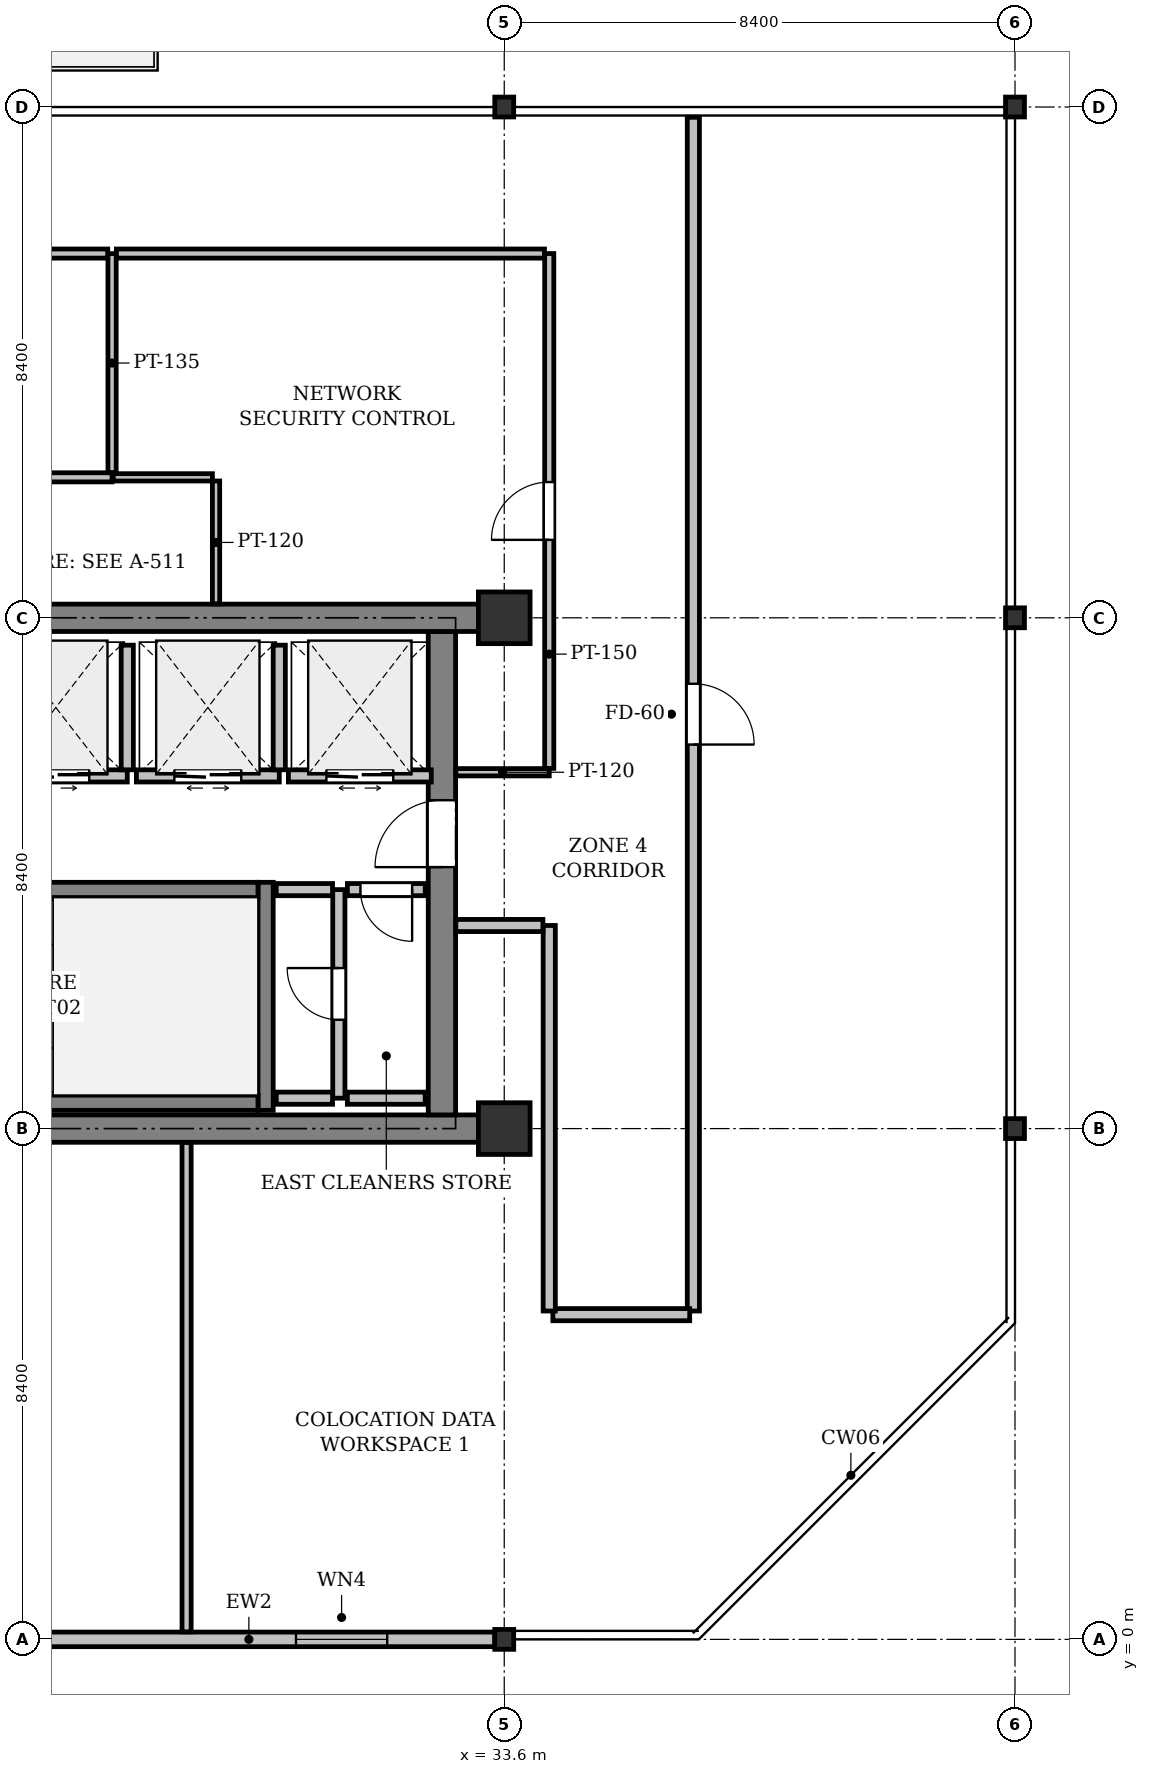
"""IFC4 building model, lengths in metres.
Left out: names, types, materials, properties, quantities, classifications, styles, units other than length and angle.
Written with IfcOpenShell. Run it as: python <this file> out.ifc"""

import sys

from ifc_helpers import new_model, si_unit, direction, frame, frame_2d, origin, origin_2d, place, context, subcontext, project, spatial, rectangle, i_section, extrude, element, fill, save


model = new_model("IFC4")
c1 = context("Model", 3, precision=1e-05, world=origin(), true_north=direction((0.0, 1.0)))
c2 = subcontext(c1, "Body", "Model", "MODEL_VIEW")
j1 = project(units=[si_unit("LENGTHUNIT", "METRE"), si_unit("PLANEANGLEUNIT", "RADIAN")], contexts=[c1])
p1 = place(None, origin())
s1 = spatial("IfcSite", under=j1, at=p1, CompositionType="ELEMENT")
p2 = place(p1, origin())
s2 = spatial("IfcBuilding", under=s1, at=p2, CompositionType="ELEMENT")
p3 = place(p2, frame((0.0, 0.0, 262.2)))
s3 = spatial("IfcBuildingStorey", under=s2, at=p3, CompositionType="ELEMENT", Elevation=262.2)
p4 = place(p3, frame((33.6, 0.0, 0.0), z_axis=(0.0, 0.0, 1.0), x_axis=(1.0, 0.0, 0.0)))
e1 = element("IfcColumn", 1, at=p4, inside=s3, PredefinedType="COLUMN", context=c2, shape_type="SweptSolid", body=[
    extrude(i_section(OverallWidth=0.311, OverallDepth=0.327, WebThickness=0.016, FlangeThickness=0.025, FilletRadius=0.017, at=origin_2d()), origin(), (0.0, 0.0, 1.0), 4.0),
])
for number, where, z_axis, x_axis in (
    (2, (33.6, 8.4, 0.0), (0.0, 0.0, 1.0), (1.0, 0.0, 0.0)),
    (3, (33.6, 16.8, 0.0), (0.0, 0.0, 1.0), (1.0, 0.0, 0.0)),
):
    element("IfcColumn", number, at=place(p3, frame(where, z_axis=z_axis, x_axis=x_axis)), inside=s3, PredefinedType="COLUMN", context=c2, shape_type="SweptSolid", body=[
        extrude(rectangle(XDim=0.85, YDim=0.85, at=origin_2d()), origin(), (0.0, 0.0, 1.0), 4.0),
    ])
for number, where, z_axis, x_axis in (
    (4, (33.6, 25.2, 0.0), (0.0, 0.0, 1.0), (1.0, 0.0, 0.0)),
    (5, (42.0, 8.4, 0.0), (0.0, 0.0, 1.0), (1.0, 0.0, 0.0)),
    (6, (42.0, 16.8, 0.0), (0.0, 0.0, 1.0), (1.0, 0.0, 0.0)),
    (7, (42.0, 25.2, 0.0), (0.0, 0.0, 1.0), (1.0, 0.0, 0.0)),
):
    element("IfcColumn", number, at=place(p3, frame(where, z_axis=z_axis, x_axis=x_axis)), inside=s3, PredefinedType="COLUMN", context=c2, shape_type="SweptSolid", body=[
        extrude(i_section(OverallWidth=0.311, OverallDepth=0.327, WebThickness=0.016, FlangeThickness=0.025, FilletRadius=0.017, at=origin_2d()), origin(), (0.0, 0.0, 1.0), 4.0),
    ])
p5 = place(p3, frame((33.445, 0.0, 0.0), z_axis=(0.0, 0.0, 1.0), x_axis=(-1.0, 0.0, 0.0)))
e8 = element("IfcWall", 8, at=p5, inside=s3, PredefinedType="STANDARD", context=c2, shape_type="SweptSolid", body=[
    extrude(rectangle(XDim=8.089, YDim=0.24, at=frame_2d((4.044, 0.0))), origin(), (0.0, 0.0, 1.0), 3.475),
])
p6 = place(p5, frame((1.77, 0.0, 0.9)))
e9 = element("IfcOpeningElement", 9, at=p6, cuts=e8, PredefinedType="OPENING", context=c2, shape_type="SweptSolid", body=[
    extrude(rectangle(XDim=1.5, YDim=1.6, at=frame_2d((0.75, 0.8))), frame((0.0, 0.13, 0.0), z_axis=(0.0, -1.0, 0.0), x_axis=(1.0, 0.0, 0.0)), (0.0, 0.0, 1.0), 0.26),
])
p7 = place(p3, frame((25.625, 8.4, 0.0), z_axis=(0.0, 0.0, 1.0), x_axis=(1.0, 0.0, 0.0)))
e10 = element("IfcWall", 10, at=p7, inside=s3, PredefinedType="SHEAR", context=c2, shape_type="SweptSolid", body=[
    extrude(rectangle(XDim=7.55, YDim=0.45, at=frame_2d((3.775, 0.0))), origin(), (0.0, 0.0, 1.0), 3.725),
])
p8 = place(p3, frame((32.575, 8.625, 0.0), z_axis=(0.0, 0.0, 1.0), x_axis=(0.0, 1.0, 0.0)))
e11 = element("IfcWall", 11, at=p8, inside=s3, PredefinedType="SHEAR", context=c2, shape_type="SweptSolid", body=[
    extrude(rectangle(XDim=7.95, YDim=0.45, at=frame_2d((3.975, 0.0))), origin(), (0.0, 0.0, 1.0), 3.725),
])
p9 = place(p8, frame((4.075, 0.0, 0.0)))
e12 = element("IfcOpeningElement", 12, at=p9, cuts=e11, PredefinedType="OPENING", context=c2, shape_type="SweptSolid", body=[
    extrude(rectangle(XDim=1.1, YDim=2.15, at=frame_2d((0.55, 1.075))), frame((0.0, 0.235, 0.0), z_axis=(0.0, -1.0, 0.0), x_axis=(1.0, 0.0, 0.0)), (0.0, 0.0, 1.0), 0.47),
])
p10 = place(p3, frame((25.625, 16.8, 0.0), z_axis=(0.0, 0.0, 1.0), x_axis=(1.0, 0.0, 0.0)))
e13 = element("IfcWall", 13, at=p10, inside=s3, PredefinedType="SHEAR", context=c2, shape_type="SweptSolid", body=[
    extrude(rectangle(XDim=7.55, YDim=0.45, at=frame_2d((3.775, 0.0))), origin(), (0.0, 0.0, 1.0), 3.725),
])
p11 = place(p3, frame((29.675, 8.7, 0.0), z_axis=(0.0, 0.0, 1.0), x_axis=(0.0, 1.0, 0.0)))
e14 = element("IfcWall", 14, at=p11, inside=s3, PredefinedType="SHEAR", context=c2, shape_type="SweptSolid", body=[
    extrude(rectangle(XDim=3.75, YDim=0.25, at=frame_2d((1.875, 0.0))), origin(), (0.0, 0.0, 1.0), 3.725),
])
p12 = place(p3, frame((21.8, 8.825, 0.0), z_axis=(0.0, 0.0, 1.0), x_axis=(1.0, 0.0, 0.0)))
e15 = element("IfcWall", 15, at=p12, inside=s3, PredefinedType="SHEAR", context=c2, shape_type="SweptSolid", body=[
    extrude(rectangle(XDim=7.75, YDim=0.25, at=frame_2d((3.875, 0.0))), origin(), (0.0, 0.0, 1.0), 3.725),
])
p13 = place(p3, frame((21.8, 12.325, 0.0), z_axis=(0.0, 0.0, 1.0), x_axis=(1.0, 0.0, 0.0)))
e16 = element("IfcWall", 16, at=p13, inside=s3, PredefinedType="SHEAR", context=c2, shape_type="SweptSolid", body=[
    extrude(rectangle(XDim=7.75, YDim=0.25, at=frame_2d((3.875, 0.0))), origin(), (0.0, 0.0, 1.0), 3.725),
])
p14 = place(p13, frame((0.22, 0.0, 0.0)))
e17 = element("IfcOpeningElement", 17, at=p14, cuts=e16, PredefinedType="OPENING", context=c2, shape_type="SweptSolid", body=[
    extrude(rectangle(XDim=1.1, YDim=2.15, at=frame_2d((0.55, 1.075))), frame((0.0, 0.135, 0.0), z_axis=(0.0, -1.0, 0.0), x_axis=(1.0, 0.0, 0.0)), (0.0, 0.0, 1.0), 0.27),
])
p15 = place(p3, frame((25.05, 14.2, 0.0), z_axis=(0.0, 0.0, 1.0), x_axis=(1.0, 0.0, 0.0)))
e18 = element("IfcWall", 18, at=p15, inside=s3, PredefinedType="PARTITIONING", context=c2, shape_type="SweptSolid", body=[
    extrude(rectangle(XDim=2.35, YDim=0.2, at=frame_2d((1.175, 0.0))), origin(), (0.0, 0.0, 1.0), 3.725),
])
p16 = place(p15, frame((0.625, 0.0, 0.0)))
e19 = element("IfcOpeningElement", 19, at=p16, cuts=e18, PredefinedType="OPENING", context=c2, shape_type="SweptSolid", body=[
    extrude(rectangle(XDim=1.1, YDim=2.2, at=frame_2d((0.55, 1.1))), frame((0.0, 0.11, 0.0), z_axis=(0.0, -1.0, 0.0), x_axis=(1.0, 0.0, 0.0)), (0.0, 0.0, 1.0), 0.22),
])
p17 = place(p3, frame((27.4, 14.3, 0.0), z_axis=(0.0, 0.0, 1.0), x_axis=(0.0, 1.0, 0.0)))
e20 = element("IfcWall", 20, at=p17, inside=s3, PredefinedType="PARTITIONING", context=c2, shape_type="SweptSolid", body=[
    extrude(rectangle(XDim=2.05, YDim=0.2, at=frame_2d((1.025, 0.0))), origin(), (0.0, 0.0, 1.0), 3.725),
])
p18 = place(p3, frame((27.55, 14.2, 0.0), z_axis=(0.0, 0.0, 1.0), x_axis=(1.0, 0.0, 0.0)))
e21 = element("IfcWall", 21, at=p18, inside=s3, PredefinedType="PARTITIONING", context=c2, shape_type="SweptSolid", body=[
    extrude(rectangle(XDim=2.35, YDim=0.2, at=frame_2d((1.175, 0.0))), origin(), (0.0, 0.0, 1.0), 3.725),
])
p19 = place(p18, frame((0.625, 0.0, 0.0)))
e22 = element("IfcOpeningElement", 22, at=p19, cuts=e21, PredefinedType="OPENING", context=c2, shape_type="SweptSolid", body=[
    extrude(rectangle(XDim=1.1, YDim=2.2, at=frame_2d((0.55, 1.1))), frame((0.0, 0.11, 0.0), z_axis=(0.0, -1.0, 0.0), x_axis=(1.0, 0.0, 0.0)), (0.0, 0.0, 1.0), 0.22),
])
p20 = place(p3, frame((29.9, 14.3, 0.0), z_axis=(0.0, 0.0, 1.0), x_axis=(0.0, 1.0, 0.0)))
e23 = element("IfcWall", 23, at=p20, inside=s3, PredefinedType="PARTITIONING", context=c2, shape_type="SweptSolid", body=[
    extrude(rectangle(XDim=2.05, YDim=0.2, at=frame_2d((1.025, 0.0))), origin(), (0.0, 0.0, 1.0), 3.725),
])
p21 = place(p3, frame((30.05, 14.2, 0.0), z_axis=(0.0, 0.0, 1.0), x_axis=(1.0, 0.0, 0.0)))
e24 = element("IfcWall", 24, at=p21, inside=s3, PredefinedType="PARTITIONING", context=c2, shape_type="SweptSolid", body=[
    extrude(rectangle(XDim=2.35, YDim=0.2, at=frame_2d((1.175, 0.0))), origin(), (0.0, 0.0, 1.0), 3.725),
])
p22 = place(p21, frame((0.625, 0.0, 0.0)))
e25 = element("IfcOpeningElement", 25, at=p22, cuts=e24, PredefinedType="OPENING", context=c2, shape_type="SweptSolid", body=[
    extrude(rectangle(XDim=1.1, YDim=2.2, at=frame_2d((0.55, 1.1))), frame((0.0, 0.11, 0.0), z_axis=(0.0, -1.0, 0.0), x_axis=(1.0, 0.0, 0.0)), (0.0, 0.0, 1.0), 0.22),
])
p23 = place(p3, frame((30.88, 8.9, 0.0), z_axis=(0.0, 0.0, 1.0), x_axis=(0.0, 1.0, 0.0)))
e26 = element("IfcWall", 26, at=p23, inside=s3, PredefinedType="PARTITIONING", context=c2, shape_type="SweptSolid", body=[
    extrude(rectangle(XDim=3.43, YDim=0.2, at=frame_2d((1.715, 0.0))), origin(), (0.0, 0.0, 1.0), 3.725),
])
p24 = place(p23, frame((1.29, 0.0, 0.0)))
e27 = element("IfcOpeningElement", 27, at=p24, cuts=e26, PredefinedType="OPENING", context=c2, shape_type="SweptSolid", body=[
    extrude(rectangle(XDim=0.85, YDim=2.15, at=frame_2d((0.425, 1.075))), frame((0.0, 0.11, 0.0), z_axis=(0.0, -1.0, 0.0), x_axis=(1.0, 0.0, 0.0)), (0.0, 0.0, 1.0), 0.22),
])
for number, where, z_axis, x_axis in (
    (28, (30.776, 12.33, 0.0), (0.0, 0.0, 1.0), (-1.0, 0.0, 0.0)),
    (29, (29.85, 8.9, 0.0), (0.0, 0.0, 1.0), (1.0, 0.0, 0.0)),
):
    element("IfcWall", number, at=place(p3, frame(where, z_axis=z_axis, x_axis=x_axis)), inside=s3, PredefinedType="PARTITIONING", context=c2, shape_type="SweptSolid", body=[
        extrude(rectangle(XDim=0.926, YDim=0.2, at=frame_2d((0.463, 0.0))), origin(), (0.0, 0.0, 1.0), 3.725),
    ])
p25 = place(p3, frame((32.3, 12.33, 0.0), z_axis=(0.0, 0.0, 1.0), x_axis=(-1.0, 0.0, 0.0)))
e30 = element("IfcWall", 30, at=p25, inside=s3, PredefinedType="PARTITIONING", context=c2, shape_type="SweptSolid", body=[
    extrude(rectangle(XDim=1.28, YDim=0.2, at=frame_2d((0.64, 0.0))), origin(), (0.0, 0.0, 1.0), 3.725),
])
p26 = place(p25, frame((0.215, 0.0, 0.0)))
e31 = element("IfcOpeningElement", 31, at=p26, cuts=e30, PredefinedType="OPENING", context=c2, shape_type="SweptSolid", body=[
    extrude(rectangle(XDim=0.85, YDim=2.15, at=frame_2d((0.425, 1.075))), frame((0.0, 0.11, 0.0), z_axis=(0.0, -1.0, 0.0), x_axis=(1.0, 0.0, 0.0)), (0.0, 0.0, 1.0), 0.22),
])
p27 = place(p3, frame((31.02, 8.9, 0.0), z_axis=(0.0, 0.0, 1.0), x_axis=(1.0, 0.0, 0.0)))
e32 = element("IfcWall", 32, at=p27, inside=s3, PredefinedType="PARTITIONING", context=c2, shape_type="SweptSolid", body=[
    extrude(rectangle(XDim=1.28, YDim=0.2, at=frame_2d((0.64, 0.0))), origin(), (0.0, 0.0, 1.0), 3.725),
])
p28 = place(p3, frame((20.031, 19.11, 0.0), z_axis=(0.0, 0.0, 1.0), x_axis=(1.0, 0.0, 0.0)))
e33 = element("IfcWall", 33, at=p28, inside=s3, PredefinedType="PARTITIONING", context=c2, shape_type="SweptSolid", body=[
    extrude(rectangle(XDim=7.118, YDim=0.15, at=frame_2d((3.559, 0.0))), origin(), (0.0, 0.0, 1.0), 3.319),
])
p29 = place(p28, frame((3.084, 0.0, 0.0)))
e34 = element("IfcOpeningElement", 34, at=p29, cuts=e33, PredefinedType="OPENING", context=c2, shape_type="SweptSolid", body=[
    extrude(rectangle(XDim=0.95, YDim=2.15, at=frame_2d((0.475, 1.075))), frame((0.0, 0.085, 0.0), z_axis=(0.0, -1.0, 0.0), x_axis=(1.0, 0.0, 0.0)), (0.0, 0.0, 1.0), 0.17),
])
p30 = place(p3, frame((27.15, 19.189, 0.0), z_axis=(0.0, 0.0, 1.0), x_axis=(0.0, 1.0, 0.0)))
e35 = element("IfcWall", 35, at=p30, inside=s3, PredefinedType="PARTITIONING", context=c2, shape_type="SweptSolid", body=[
    extrude(rectangle(XDim=3.601, YDim=0.135, at=frame_2d((1.801, 0.0))), origin(), (0.0, 0.0, 1.0), 3.725),
])
p31 = place(p3, frame((27.079, 22.79, 0.0), z_axis=(0.0, 0.0, 1.0), x_axis=(-1.0, 0.0, 0.0)))
e36 = element("IfcWall", 36, at=p31, inside=s3, PredefinedType="PARTITIONING", context=c2, shape_type="SweptSolid", body=[
    extrude(rectangle(XDim=7.047, YDim=0.15, at=frame_2d((3.523, 0.0))), origin(), (0.0, 0.0, 1.0), 3.319),
])
p32 = place(p3, frame((28.86, 19.05, 0.0), z_axis=(0.0, 0.0, 1.0), x_axis=(0.0, -1.0, 0.0)))
e37 = element("IfcWall", 37, at=p32, inside=s3, PredefinedType="PARTITIONING", context=c2, shape_type="SweptSolid", body=[
    extrude(rectangle(XDim=2.021, YDim=0.12, at=frame_2d((1.01, 0.0))), origin(), (0.0, 0.0, 1.0), 3.725),
])
p33 = place(p3, frame((32.804, 14.26, 0.0), z_axis=(0.0, 0.0, 1.0), x_axis=(1.0, 0.0, 0.0)))
e38 = element("IfcWall", 38, at=p33, inside=s3, PredefinedType="PARTITIONING", context=c2, shape_type="SweptSolid", body=[
    extrude(rectangle(XDim=1.536, YDim=0.12, at=frame_2d((0.768, 0.0))), origin(), (0.0, 0.0, 1.0), 3.319),
])
p34 = place(p3, frame((34.34, 14.324, 0.0), z_axis=(0.0, 0.0, 1.0), x_axis=(0.0, 1.0, 0.0)))
e39 = element("IfcWall", 39, at=p34, inside=s3, PredefinedType="PARTITIONING", context=c2, shape_type="SweptSolid", body=[
    extrude(rectangle(XDim=8.466, YDim=0.15, at=frame_2d((4.233, 0.0))), origin(), (0.0, 0.0, 1.0), 3.271),
])
p35 = place(p34, frame((3.758, 0.0, 0.0)))
e40 = element("IfcOpeningElement", 40, at=p35, cuts=e39, PredefinedType="OPENING", context=c2, shape_type="SweptSolid", body=[
    extrude(rectangle(XDim=0.95, YDim=2.15, at=frame_2d((0.475, 1.075))), frame((0.0, 0.085, 0.0), z_axis=(0.0, -1.0, 0.0), x_axis=(1.0, 0.0, 0.0)), (0.0, 0.0, 1.0), 0.17),
])
p36 = place(p3, frame((34.261, 22.79, 0.0), z_axis=(0.0, 0.0, 1.0), x_axis=(-1.0, 0.0, 0.0)))
e41 = element("IfcWall", 41, at=p36, inside=s3, PredefinedType="PARTITIONING", context=c2, shape_type="SweptSolid", body=[
    extrude(rectangle(XDim=7.04, YDim=0.15, at=frame_2d((3.52, 0.0))), origin(), (0.0, 0.0, 1.0), 3.319),
])
p37 = place(p3, frame((27.17, 19.11, 0.0), z_axis=(0.0, 0.0, 1.0), x_axis=(1.0, 0.0, 0.0)))
e42 = element("IfcWall", 42, at=p37, inside=s3, PredefinedType="PARTITIONING", context=c2, shape_type="SweptSolid", body=[
    extrude(rectangle(XDim=1.63, YDim=0.12, at=frame_2d((0.815, 0.0))), origin(), (0.0, 0.0, 1.0), 3.725),
])
p38 = place(p3, frame((28.375, 0.124, 0.0), z_axis=(0.0, 0.0, 1.0), x_axis=(0.0, 1.0, 0.0)))
e43 = element("IfcWall", 43, at=p38, inside=s3, PredefinedType="PARTITIONING", context=c2, shape_type="SweptSolid", body=[
    extrude(rectangle(XDim=8.047, YDim=0.15, at=frame_2d((4.023, 0.0))), origin(), (0.0, 0.0, 1.0), 3.725),
])
p39 = place(p3, frame((36.71, 25.031, 0.0), z_axis=(0.0, 0.0, 1.0), x_axis=(0.0, -1.0, 0.0)))
e44 = element("IfcWall", 44, at=p39, inside=s3, PredefinedType="PARTITIONING", context=c2, shape_type="SweptSolid", body=[
    extrude(rectangle(XDim=19.631, YDim=0.2, at=frame_2d((9.815, 0.0))), origin(), (0.0, 0.0, 1.0), 3.271),
])
p40 = place(p39, frame((9.315, 0.0, 0.0)))
e45 = element("IfcOpeningElement", 45, at=p40, cuts=e44, PredefinedType="OPENING", context=c2, shape_type="SweptSolid", body=[
    extrude(rectangle(XDim=1.0, YDim=2.15, at=frame_2d((0.5, 1.075))), frame((0.0, 0.11, 0.0), z_axis=(0.0, -1.0, 0.0), x_axis=(1.0, 0.0, 0.0)), (0.0, 0.0, 1.0), 0.22),
])
p41 = place(p3, frame((36.65, 5.34, 0.0), z_axis=(0.0, 0.0, 1.0), x_axis=(-1.0, 0.0, 0.0)))
e46 = element("IfcWall", 46, at=p41, inside=s3, PredefinedType="PARTITIONING", context=c2, shape_type="SweptSolid", body=[
    extrude(rectangle(XDim=2.25, YDim=0.2, at=frame_2d((1.125, 0.0))), origin(), (0.0, 0.0, 1.0), 3.725),
])
p42 = place(p3, frame((34.34, 5.4, 0.0), z_axis=(0.0, 0.0, 1.0), x_axis=(0.0, 1.0, 0.0)))
e47 = element("IfcWall", 47, at=p42, inside=s3, PredefinedType="PARTITIONING", context=c2, shape_type="SweptSolid", body=[
    extrude(rectangle(XDim=6.34, YDim=0.2, at=frame_2d((3.17, 0.0))), origin(), (0.0, 0.0, 1.0), 3.271),
])
p43 = place(p3, frame((34.236, 11.74, 0.0), z_axis=(0.0, 0.0, 1.0), x_axis=(-1.0, 0.0, 0.0)))
e48 = element("IfcWall", 48, at=p43, inside=s3, PredefinedType="PARTITIONING", context=c2, shape_type="SweptSolid", body=[
    extrude(rectangle(XDim=1.432, YDim=0.2, at=frame_2d((0.716, 0.0))), origin(), (0.0, 0.0, 1.0), 3.319),
])
p44 = place(p6, origin())
e49 = element("IfcWindow", 49, at=p44, inside=s3, PartitioningType="SINGLE_PANEL", PredefinedType="WINDOW", context=c2, shape_type="SweptSolid", body=[
    extrude(rectangle(XDim=1.5, YDim=1.6, at=frame_2d((0.75, 0.8))), frame((0.0, 0.03, 0.0), z_axis=(0.0, -1.0, 0.0), x_axis=(1.0, 0.0, 0.0)), (0.0, 0.0, 1.0), 0.06),
])
fill(e9, e49)
p45 = place(p9, origin())
e50 = element("IfcDoor", 50, at=p45, inside=s3, OperationType="SINGLE_SWING_LEFT", PredefinedType="DOOR", context=c2, shape_type="SweptSolid", body=[
    extrude(rectangle(XDim=1.1, YDim=2.15, at=frame_2d((0.55, 1.075))), frame((0.0, 0.025, 0.0), z_axis=(0.0, -1.0, 0.0), x_axis=(1.0, 0.0, 0.0)), (0.0, 0.0, 1.0), 0.05),
])
fill(e12, e50)
p46 = place(p16, origin())
e51 = element("IfcDoor", 51, at=p46, inside=s3, OperationType="DOUBLE_DOOR_SLIDING", PredefinedType="DOOR", context=c2, shape_type="SweptSolid", body=[
    extrude(rectangle(XDim=1.1, YDim=2.2, at=frame_2d((0.55, 1.1))), frame((0.0, 0.025, 0.0), z_axis=(0.0, -1.0, 0.0), x_axis=(1.0, 0.0, 0.0)), (0.0, 0.0, 1.0), 0.05),
])
fill(e19, e51)
p47 = place(p19, origin())
e52 = element("IfcDoor", 52, at=p47, inside=s3, OperationType="DOUBLE_DOOR_SLIDING", PredefinedType="DOOR", context=c2, shape_type="SweptSolid", body=[
    extrude(rectangle(XDim=1.1, YDim=2.2, at=frame_2d((0.55, 1.1))), frame((0.0, 0.025, 0.0), z_axis=(0.0, -1.0, 0.0), x_axis=(1.0, 0.0, 0.0)), (0.0, 0.0, 1.0), 0.05),
])
fill(e22, e52)
p48 = place(p22, origin())
e53 = element("IfcDoor", 53, at=p48, inside=s3, OperationType="DOUBLE_DOOR_SLIDING", PredefinedType="DOOR", context=c2, shape_type="SweptSolid", body=[
    extrude(rectangle(XDim=1.1, YDim=2.2, at=frame_2d((0.55, 1.1))), frame((0.0, 0.025, 0.0), z_axis=(0.0, -1.0, 0.0), x_axis=(1.0, 0.0, 0.0)), (0.0, 0.0, 1.0), 0.05),
])
fill(e25, e53)
p49 = place(p24, origin())
e54 = element("IfcDoor", 54, at=p49, inside=s3, OperationType="SINGLE_SWING_RIGHT", PredefinedType="DOOR", context=c2, shape_type="SweptSolid", body=[
    extrude(rectangle(XDim=0.85, YDim=2.15, at=frame_2d((0.425, 1.075))), frame((0.0, 0.025, 0.0), z_axis=(0.0, -1.0, 0.0), x_axis=(1.0, 0.0, 0.0)), (0.0, 0.0, 1.0), 0.05),
])
fill(e27, e54)
p50 = place(p26, origin())
e55 = element("IfcDoor", 55, at=p50, inside=s3, OperationType="SINGLE_SWING_LEFT", PredefinedType="DOOR", context=c2, shape_type="SweptSolid", body=[
    extrude(rectangle(XDim=0.85, YDim=2.15, at=frame_2d((0.425, 1.075))), frame((0.0, 0.025, 0.0), z_axis=(0.0, -1.0, 0.0), x_axis=(1.0, 0.0, 0.0)), (0.0, 0.0, 1.0), 0.05),
])
fill(e31, e55)
p51 = place(p35, origin())
e56 = element("IfcDoor", 56, at=p51, inside=s3, OperationType="SINGLE_SWING_LEFT", PredefinedType="DOOR", context=c2, shape_type="SweptSolid", body=[
    extrude(rectangle(XDim=0.95, YDim=2.15, at=frame_2d((0.475, 1.075))), frame((0.0, 0.025, 0.0), z_axis=(0.0, -1.0, 0.0), x_axis=(1.0, 0.0, 0.0)), (0.0, 0.0, 1.0), 0.05),
])
fill(e40, e56)
p52 = place(p40, origin())
e57 = element("IfcDoor", 57, at=p52, inside=s3, OperationType="SINGLE_SWING_RIGHT", PredefinedType="DOOR", context=c2, shape_type="SweptSolid", body=[
    extrude(rectangle(XDim=1.0, YDim=2.15, at=frame_2d((0.5, 1.075))), frame((0.0, 0.025, 0.0), z_axis=(0.0, -1.0, 0.0), x_axis=(1.0, 0.0, 0.0)), (0.0, 0.0, 1.0), 0.05),
])
fill(e45, e57)
save(model, sys.argv[1])
